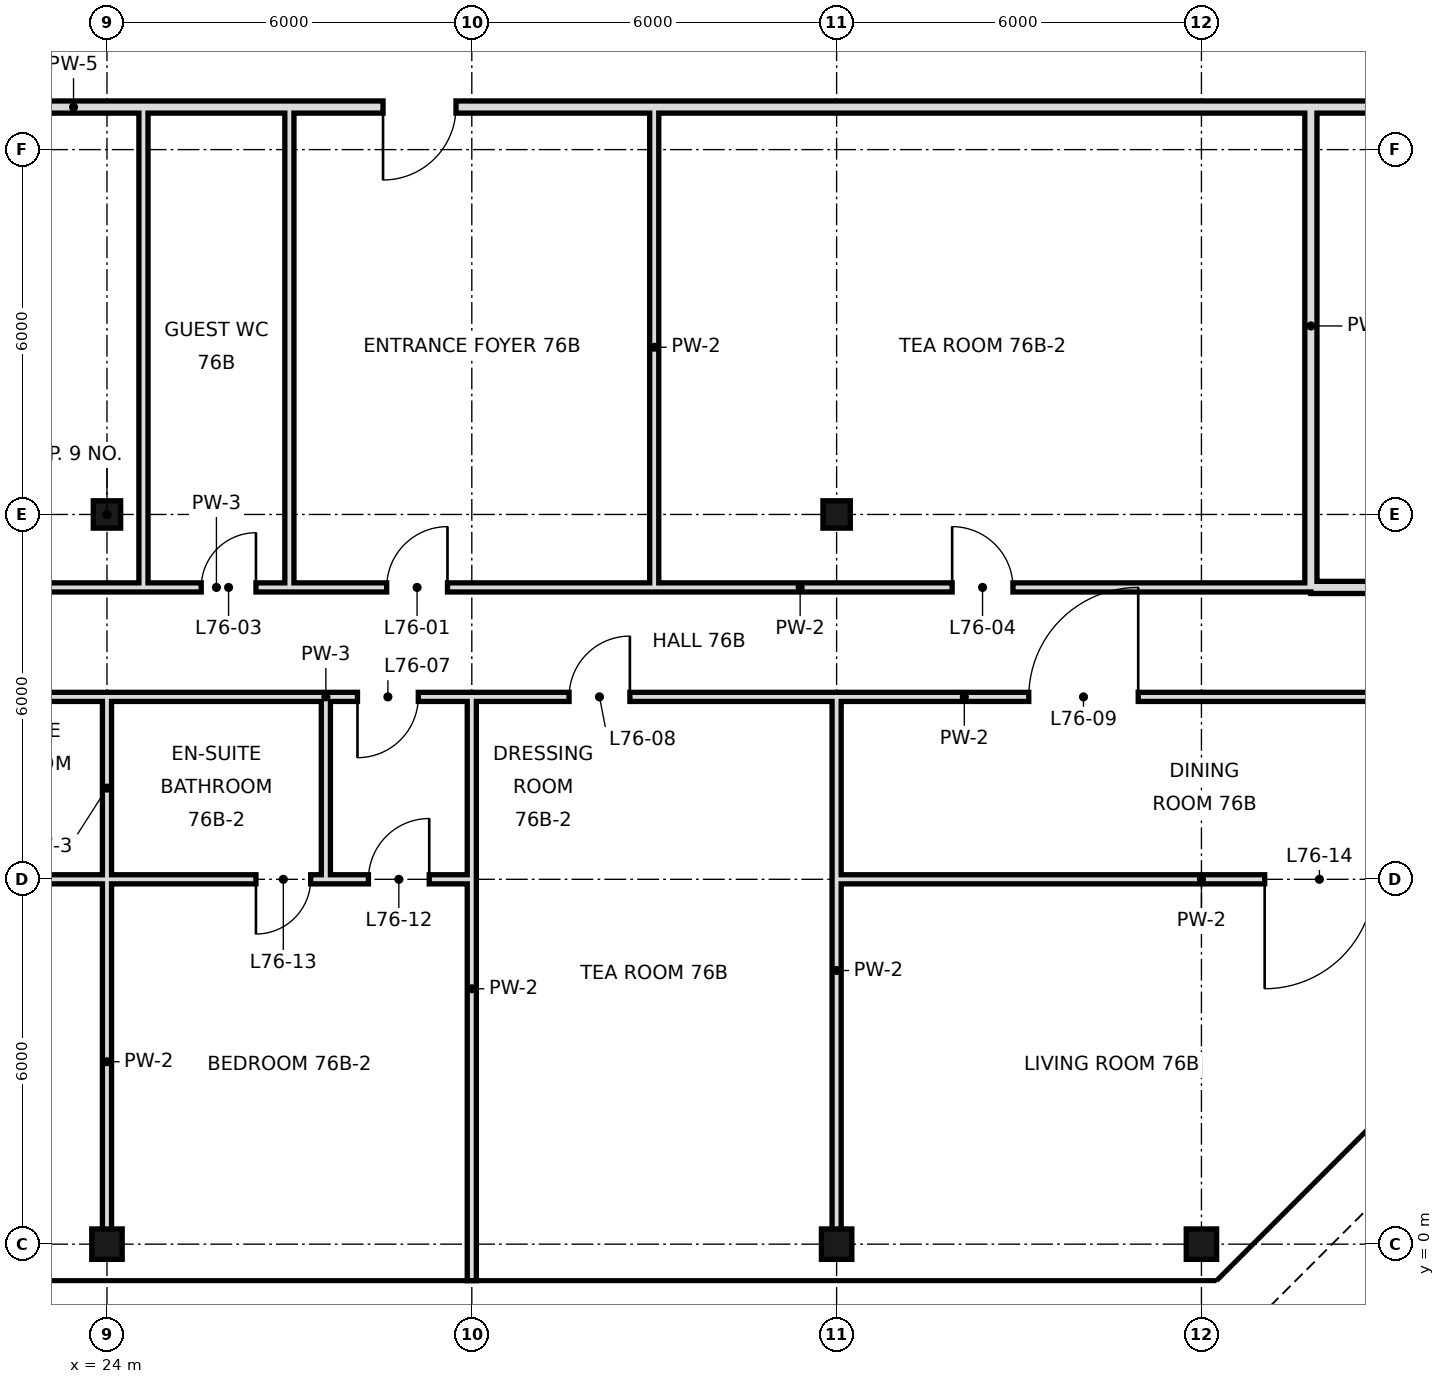
"""IFC4 building model, lengths in metres.
Left out: names, types, materials, properties, quantities, classifications, styles, units other than length and angle.
Written with IfcOpenShell. Run it as: python <this file> out.ifc"""

import sys

from ifc_helpers import new_model, si_unit, direction, frame, frame_2d, origin, origin_2d, place, context, subcontext, project, spatial, rectangle, hollow_rectangle, extrude, element, fill, save


model = new_model("IFC4")
c1 = context("Model", 3, precision=1e-05, world=origin(), true_north=direction((0.0, 1.0)))
c2 = subcontext(c1, "Body", "Model", "MODEL_VIEW")
j1 = project(units=[si_unit("LENGTHUNIT", "METRE"), si_unit("PLANEANGLEUNIT", "RADIAN")], contexts=[c1])
p1 = place(None, origin())
s1 = spatial("IfcSite", under=j1, at=p1, CompositionType="ELEMENT")
p2 = place(p1, origin())
s2 = spatial("IfcBuilding", under=s1, at=p2, CompositionType="ELEMENT")
p3 = place(p2, frame((0.0, 0.0, 319.6)))
s3 = spatial("IfcBuildingStorey", under=s2, at=p3, CompositionType="ELEMENT", Elevation=319.6)
p4 = place(p3, frame((24.0, 0.0, 0.0), z_axis=(0.0, 0.0, 1.0), x_axis=(1.0, 0.0, 0.0)))
e1 = element("IfcColumn", 1, at=p4, inside=s3, PredefinedType="COLUMN", context=c2, shape_type="SweptSolid", body=[
    extrude(hollow_rectangle(XDim=0.5, YDim=0.5, WallThickness=0.025, at=origin_2d()), origin(), (0.0, 0.0, 1.0), 3.6),
])
p5 = place(p3, frame((24.0, 12.0, 0.0), z_axis=(0.0, 0.0, 1.0), x_axis=(1.0, 0.0, 0.0)))
e2 = element("IfcColumn", 2, at=p5, inside=s3, PredefinedType="COLUMN", context=c2, shape_type="SweptSolid", body=[
    extrude(hollow_rectangle(XDim=0.45, YDim=0.45, WallThickness=0.022, at=origin_2d()), origin(), (0.0, 0.0, 1.0), 3.6),
])
p6 = place(p3, frame((36.0, 0.0, 0.0), z_axis=(0.0, 0.0, 1.0), x_axis=(1.0, 0.0, 0.0)))
e3 = element("IfcColumn", 3, at=p6, inside=s3, PredefinedType="COLUMN", context=c2, shape_type="SweptSolid", body=[
    extrude(hollow_rectangle(XDim=0.5, YDim=0.5, WallThickness=0.025, at=origin_2d()), origin(), (0.0, 0.0, 1.0), 3.6),
])
p7 = place(p3, frame((36.0, 12.0, 0.0), z_axis=(0.0, 0.0, 1.0), x_axis=(1.0, 0.0, 0.0)))
e4 = element("IfcColumn", 4, at=p7, inside=s3, PredefinedType="COLUMN", context=c2, shape_type="SweptSolid", body=[
    extrude(hollow_rectangle(XDim=0.45, YDim=0.45, WallThickness=0.022, at=origin_2d()), origin(), (0.0, 0.0, 1.0), 3.6),
])
p8 = place(p3, frame((42.0, 0.0, 0.0), z_axis=(0.0, 0.0, 1.0), x_axis=(1.0, 0.0, 0.0)))
e5 = element("IfcColumn", 5, at=p8, inside=s3, PredefinedType="COLUMN", context=c2, shape_type="SweptSolid", body=[
    extrude(hollow_rectangle(XDim=0.5, YDim=0.5, WallThickness=0.025, at=origin_2d()), origin(), (0.0, 0.0, 1.0), 3.6),
])
p9 = place(p3, frame((24.0, 0.0, 0.0), z_axis=(0.0, 0.0, 1.0), x_axis=(0.0, 1.0, 0.0)))
e6 = element("IfcWall", 6, at=p9, inside=s3, PredefinedType="PARTITIONING", context=c2, shape_type="SweptSolid", body=[
    extrude(rectangle(XDim=6.0, YDim=0.15, at=frame_2d((3.0, 0.0))), origin(), (0.0, 0.0, 1.0), 2.72),
])
p10 = place(p3, frame((24.0, 6.0, 0.0), z_axis=(0.0, 0.0, 1.0), x_axis=(0.0, 1.0, 0.0)))
e7 = element("IfcWall", 7, at=p10, inside=s3, PredefinedType="PARTITIONING", context=c2, shape_type="SweptSolid", body=[
    extrude(rectangle(XDim=3.0, YDim=0.15, at=frame_2d((1.5, 0.0))), origin(), (0.0, 0.0, 1.0), 2.72),
])
for number, where, z_axis, x_axis in (
    (8, (24.6, 10.8, 0.0), (0.0, 0.0, 1.0), (0.0, 1.0, 0.0)),
    (9, (27.0, 10.8, 0.0), (0.0, 0.0, 1.0), (0.0, 1.0, 0.0)),
):
    element("IfcWall", number, at=place(p3, frame(where, z_axis=z_axis, x_axis=x_axis)), inside=s3, PredefinedType="PARTITIONING", context=c2, shape_type="SweptSolid", body=[
        extrude(rectangle(XDim=7.9, YDim=0.15, at=frame_2d((3.95, 0.0))), origin(), (0.0, 0.0, 1.0), 3.42),
    ])
p11 = place(p3, frame((27.6, 6.0, 0.0), z_axis=(0.0, 0.0, 1.0), x_axis=(0.0, 1.0, 0.0)))
e10 = element("IfcWall", 10, at=p11, inside=s3, PredefinedType="PARTITIONING", context=c2, shape_type="SweptSolid", body=[
    extrude(rectangle(XDim=3.0, YDim=0.15, at=frame_2d((1.5, 0.0))), origin(), (0.0, 0.0, 1.0), 3.42),
])
p12 = place(p3, frame((30.0, -0.6, 0.0), z_axis=(0.0, 0.0, 1.0), x_axis=(0.0, 1.0, 0.0)))
e11 = element("IfcWall", 11, at=p12, inside=s3, PredefinedType="PARTITIONING", context=c2, shape_type="SweptSolid", body=[
    extrude(rectangle(XDim=9.6, YDim=0.15, at=frame_2d((4.8, 0.0))), origin(), (0.0, 0.0, 1.0), 2.72),
])
p13 = place(p3, frame((33.0, 10.8, 0.0), z_axis=(0.0, 0.0, 1.0), x_axis=(0.0, 1.0, 0.0)))
e12 = element("IfcWall", 12, at=p13, inside=s3, PredefinedType="PARTITIONING", context=c2, shape_type="SweptSolid", body=[
    extrude(rectangle(XDim=7.9, YDim=0.15, at=frame_2d((3.95, 0.0))), origin(), (0.0, 0.0, 1.0), 3.42),
])
p14 = place(p3, frame((36.0, 0.0, 0.0), z_axis=(0.0, 0.0, 1.0), x_axis=(0.0, 1.0, 0.0)))
e13 = element("IfcWall", 13, at=p14, inside=s3, PredefinedType="PARTITIONING", context=c2, shape_type="SweptSolid", body=[
    extrude(rectangle(XDim=9.0, YDim=0.15, at=frame_2d((4.5, 0.0))), origin(), (0.0, 0.0, 1.0), 2.72),
])
p15 = place(p3, frame((43.8, 10.8, 0.0), z_axis=(0.0, 0.0, 1.0), x_axis=(0.0, 1.0, 0.0)))
e14 = element("IfcWall", 14, at=p15, inside=s3, PredefinedType="SOLIDWALL", context=c2, shape_type="SweptSolid", body=[
    extrude(rectangle(XDim=7.9, YDim=0.2, at=frame_2d((3.95, 0.0))), origin(), (0.0, 0.0, 1.0), 2.72),
])
p16 = place(p3, frame((43.8, 10.8, 0.0), z_axis=(0.0, 0.0, 1.0), x_axis=(1.0, 0.0, 0.0)))
e15 = element("IfcWall", 15, at=p16, inside=s3, PredefinedType="SOLIDWALL", context=c2, shape_type="SweptSolid", body=[
    extrude(rectangle(XDim=4.8, YDim=0.2, at=frame_2d((2.4, 0.0))), origin(), (0.0, 0.0, 1.0), 2.97),
])
p17 = place(p16, frame((1.06, 0.0, 0.0)))
e16 = element("IfcOpeningElement", 16, at=p17, cuts=e15, PredefinedType="OPENING", context=c2, shape_type="SweptSolid", body=[
    extrude(rectangle(XDim=1.0, YDim=2.4, at=frame_2d((0.5, 1.2))), frame((0.0, 0.11, 0.0), z_axis=(0.0, -1.0, 0.0), x_axis=(1.0, 0.0, 0.0)), (0.0, 0.0, 1.0), 0.22),
])
p18 = place(p3, frame((18.0, 10.8, 0.0), z_axis=(0.0, 0.0, 1.0), x_axis=(1.0, 0.0, 0.0)))
e17 = element("IfcWall", 17, at=p18, inside=s3, PredefinedType="PARTITIONING", context=c2, shape_type="SweptSolid", body=[
    extrude(rectangle(XDim=6.6, YDim=0.15, at=frame_2d((3.3, 0.0))), origin(), (0.0, 0.0, 1.0), 3.42),
])
p19 = place(p18, frame((2.8, 0.0, 0.0)))
e18 = element("IfcOpeningElement", 18, at=p19, cuts=e17, PredefinedType="OPENING", context=c2, shape_type="SweptSolid", body=[
    extrude(rectangle(XDim=1.0, YDim=2.4, at=frame_2d((0.5, 1.2))), frame((0.0, 0.085, 0.0), z_axis=(0.0, -1.0, 0.0), x_axis=(1.0, 0.0, 0.0)), (0.0, 0.0, 1.0), 0.17),
])
p20 = place(p3, frame((27.0, 10.8, 0.0), z_axis=(0.0, 0.0, 1.0), x_axis=(1.0, 0.0, 0.0)))
e19 = element("IfcWall", 19, at=p20, inside=s3, PredefinedType="PARTITIONING", context=c2, shape_type="SweptSolid", body=[
    extrude(rectangle(XDim=16.8, YDim=0.15, at=frame_2d((8.4, 0.0))), origin(), (0.0, 0.0, 1.0), 3.42),
])
p21 = place(p20, frame((1.6, 0.0, 0.0)))
e20 = element("IfcOpeningElement", 20, at=p21, cuts=e19, PredefinedType="OPENING", context=c2, shape_type="SweptSolid", body=[
    extrude(rectangle(XDim=1.0, YDim=2.4, at=frame_2d((0.5, 1.2))), frame((0.0, 0.085, 0.0), z_axis=(0.0, -1.0, 0.0), x_axis=(1.0, 0.0, 0.0)), (0.0, 0.0, 1.0), 0.17),
])
p22 = place(p20, frame((10.9, 0.0, 0.0)))
e21 = element("IfcOpeningElement", 21, at=p22, cuts=e19, PredefinedType="OPENING", context=c2, shape_type="SweptSolid", body=[
    extrude(rectangle(XDim=1.0, YDim=2.4, at=frame_2d((0.5, 1.2))), frame((0.0, 0.085, 0.0), z_axis=(0.0, -1.0, 0.0), x_axis=(1.0, 0.0, 0.0)), (0.0, 0.0, 1.0), 0.17),
])
p23 = place(p3, frame((24.6, 10.8, 0.0), z_axis=(0.0, 0.0, 1.0), x_axis=(1.0, 0.0, 0.0)))
e22 = element("IfcWall", 22, at=p23, inside=s3, PredefinedType="PARTITIONING", context=c2, shape_type="SweptSolid", body=[
    extrude(rectangle(XDim=2.4, YDim=0.15, at=frame_2d((1.2, 0.0))), origin(), (0.0, 0.0, 1.0), 3.42),
])
p24 = place(p23, frame((0.95, 0.0, 0.0)))
e23 = element("IfcOpeningElement", 23, at=p24, cuts=e22, PredefinedType="OPENING", context=c2, shape_type="SweptSolid", body=[
    extrude(rectangle(XDim=0.9, YDim=2.4, at=frame_2d((0.45, 1.2))), frame((0.0, 0.085, 0.0), z_axis=(0.0, -1.0, 0.0), x_axis=(1.0, 0.0, 0.0)), (0.0, 0.0, 1.0), 0.17),
])
p25 = place(p3, frame((3.1, 18.7, 0.0), z_axis=(0.0, 0.0, 1.0), x_axis=(1.0, 0.0, 0.0)))
e24 = element("IfcWall", 24, at=p25, inside=s3, PredefinedType="SOLIDWALL", context=c2, shape_type="SweptSolid", body=[
    extrude(rectangle(XDim=40.7, YDim=0.2, at=frame_2d((20.35, 0.0))), origin(), (0.0, 0.0, 1.0), 2.72),
])
p26 = place(p25, frame((25.44, 0.0, 0.0)))
e25 = element("IfcOpeningElement", 25, at=p26, cuts=e24, PredefinedType="OPENING", context=c2, shape_type="SweptSolid", body=[
    extrude(rectangle(XDim=1.2, YDim=2.4, at=frame_2d((0.6, 1.2))), frame((0.0, 0.11, 0.0), z_axis=(0.0, -1.0, 0.0), x_axis=(1.0, 0.0, 0.0)), (0.0, 0.0, 1.0), 0.22),
])
p27 = place(p25, frame((6.55, 0.0, 0.0)))
e26 = element("IfcOpeningElement", 26, at=p27, cuts=e24, PredefinedType="OPENING", context=c2, shape_type="SweptSolid", body=[
    extrude(rectangle(XDim=1.8, YDim=2.4, at=frame_2d((0.9, 1.2))), frame((0.0, 0.11, 0.0), z_axis=(0.0, -1.0, 0.0), x_axis=(1.0, 0.0, 0.0)), (0.0, 0.0, 1.0), 0.22),
])
p28 = place(p3, frame((43.8, 18.7, 0.0), z_axis=(0.0, 0.0, 1.0), x_axis=(1.0, 0.0, 0.0)))
e27 = element("IfcWall", 27, at=p28, inside=s3, PredefinedType="SOLIDWALL", context=c2, shape_type="SweptSolid", body=[
    extrude(rectangle(XDim=1.1, YDim=0.2, at=frame_2d((0.55, 0.0))), origin(), (0.0, 0.0, 1.0), 3.42),
])
p29 = place(p3, frame((27.6, 6.0, 0.0), z_axis=(0.0, 0.0, 1.0), x_axis=(1.0, 0.0, 0.0)))
e28 = element("IfcWall", 28, at=p29, inside=s3, PredefinedType="PARTITIONING", context=c2, shape_type="SweptSolid", body=[
    extrude(rectangle(XDim=2.4, YDim=0.15, at=frame_2d((1.2, 0.0))), origin(), (0.0, 0.0, 1.0), 2.97),
])
p30 = place(p29, frame((0.7, 0.0, 0.0)))
e29 = element("IfcOpeningElement", 29, at=p30, cuts=e28, PredefinedType="OPENING", context=c2, shape_type="SweptSolid", body=[
    extrude(rectangle(XDim=1.0, YDim=2.4, at=frame_2d((0.5, 1.2))), frame((0.0, 0.085, 0.0), z_axis=(0.0, -1.0, 0.0), x_axis=(1.0, 0.0, 0.0)), (0.0, 0.0, 1.0), 0.17),
])
p31 = place(p3, frame((36.0, 6.0, 0.0), z_axis=(0.0, 0.0, 1.0), x_axis=(1.0, 0.0, 0.0)))
e30 = element("IfcWall", 30, at=p31, inside=s3, PredefinedType="PARTITIONING", context=c2, shape_type="SweptSolid", body=[
    extrude(rectangle(XDim=12.0, YDim=0.15, at=frame_2d((6.0, 0.0))), origin(), (0.0, 0.0, 1.0), 2.97),
])
p32 = place(p31, frame((7.04, 0.0, 0.0)))
e31 = element("IfcOpeningElement", 31, at=p32, cuts=e30, PredefinedType="OPENING", context=c2, shape_type="SweptSolid", body=[
    extrude(rectangle(XDim=1.8, YDim=2.4, at=frame_2d((0.9, 1.2))), frame((0.0, 0.085, 0.0), z_axis=(0.0, -1.0, 0.0), x_axis=(1.0, 0.0, 0.0)), (0.0, 0.0, 1.0), 0.17),
])
p33 = place(p3, frame((21.0, 6.0, 0.0), z_axis=(0.0, 0.0, 1.0), x_axis=(1.0, 0.0, 0.0)))
e32 = element("IfcWall", 32, at=p33, inside=s3, PredefinedType="PARTITIONING", context=c2, shape_type="SweptSolid", body=[
    extrude(rectangle(XDim=6.6, YDim=0.15, at=frame_2d((3.3, 0.0))), origin(), (0.0, 0.0, 1.0), 2.97),
])
p34 = place(p33, frame((0.25, 0.0, 0.0)))
e33 = element("IfcOpeningElement", 33, at=p34, cuts=e32, PredefinedType="OPENING", context=c2, shape_type="SweptSolid", body=[
    extrude(rectangle(XDim=0.9, YDim=2.4, at=frame_2d((0.45, 1.2))), frame((0.0, 0.085, 0.0), z_axis=(0.0, -1.0, 0.0), x_axis=(1.0, 0.0, 0.0)), (0.0, 0.0, 1.0), 0.17),
])
p35 = place(p33, frame((5.45, 0.0, 0.0)))
e34 = element("IfcOpeningElement", 34, at=p35, cuts=e32, PredefinedType="OPENING", context=c2, shape_type="SweptSolid", body=[
    extrude(rectangle(XDim=0.9, YDim=2.4, at=frame_2d((0.45, 1.2))), frame((0.0, 0.085, 0.0), z_axis=(0.0, -1.0, 0.0), x_axis=(1.0, 0.0, 0.0)), (0.0, 0.0, 1.0), 0.17),
])
p36 = place(p3, frame((27.6, 9.0, 0.0), z_axis=(0.0, 0.0, 1.0), x_axis=(1.0, 0.0, 0.0)))
e35 = element("IfcWall", 35, at=p36, inside=s3, PredefinedType="PARTITIONING", context=c2, shape_type="SweptSolid", body=[
    extrude(rectangle(XDim=21.0, YDim=0.15, at=frame_2d((10.5, 0.0))), origin(), (0.0, 0.0, 1.0), 3.42),
])
p37 = place(p36, frame((0.52, 0.0, 0.0)))
e36 = element("IfcOpeningElement", 36, at=p37, cuts=e35, PredefinedType="OPENING", context=c2, shape_type="SweptSolid", body=[
    extrude(rectangle(XDim=1.0, YDim=2.4, at=frame_2d((0.5, 1.2))), frame((0.0, 0.085, 0.0), z_axis=(0.0, -1.0, 0.0), x_axis=(1.0, 0.0, 0.0)), (0.0, 0.0, 1.0), 0.17),
])
p38 = place(p36, frame((4.0, 0.0, 0.0)))
e37 = element("IfcOpeningElement", 37, at=p38, cuts=e35, PredefinedType="OPENING", context=c2, shape_type="SweptSolid", body=[
    extrude(rectangle(XDim=1.0, YDim=2.4, at=frame_2d((0.5, 1.2))), frame((0.0, 0.085, 0.0), z_axis=(0.0, -1.0, 0.0), x_axis=(1.0, 0.0, 0.0)), (0.0, 0.0, 1.0), 0.17),
])
p39 = place(p36, frame((11.56, 0.0, 0.0)))
e38 = element("IfcOpeningElement", 38, at=p39, cuts=e35, PredefinedType="OPENING", context=c2, shape_type="SweptSolid", body=[
    extrude(rectangle(XDim=1.8, YDim=2.4, at=frame_2d((0.9, 1.2))), frame((0.0, 0.085, 0.0), z_axis=(0.0, -1.0, 0.0), x_axis=(1.0, 0.0, 0.0)), (0.0, 0.0, 1.0), 0.17),
])
p40 = place(p3, frame((21.0, 9.0, 0.0), z_axis=(0.0, 0.0, 1.0), x_axis=(1.0, 0.0, 0.0)))
e39 = element("IfcWall", 39, at=p40, inside=s3, PredefinedType="PARTITIONING", context=c2, shape_type="SweptSolid", body=[
    extrude(rectangle(XDim=6.6, YDim=0.15, at=frame_2d((3.3, 0.0))), origin(), (0.0, 0.0, 1.0), 3.42),
])
p41 = place(p21, frame((1.0, 0.0, 0.0), z_axis=(0.0, 0.0, 1.0), x_axis=(-1.0, 0.0, 0.0)))
e40 = element("IfcDoor", 40, at=p41, inside=s3, OperationType="SINGLE_SWING_LEFT", PredefinedType="DOOR", context=c2, shape_type="SweptSolid", body=[
    extrude(rectangle(XDim=1.0, YDim=2.4, at=frame_2d((0.5, 1.2))), frame((0.0, 0.025, 0.0), z_axis=(0.0, -1.0, 0.0), x_axis=(1.0, 0.0, 0.0)), (0.0, 0.0, 1.0), 0.05),
])
fill(e20, e40)
p42 = place(p24, frame((0.9, 0.0, 0.0), z_axis=(0.0, 0.0, 1.0), x_axis=(-1.0, 0.0, 0.0)))
e41 = element("IfcDoor", 41, at=p42, inside=s3, OperationType="SINGLE_SWING_LEFT", PredefinedType="DOOR", context=c2, shape_type="SweptSolid", body=[
    extrude(rectangle(XDim=0.9, YDim=2.4, at=frame_2d((0.45, 1.2))), frame((0.0, 0.025, 0.0), z_axis=(0.0, -1.0, 0.0), x_axis=(1.0, 0.0, 0.0)), (0.0, 0.0, 1.0), 0.05),
])
fill(e23, e41)
p43 = place(p22, origin())
e42 = element("IfcDoor", 42, at=p43, inside=s3, OperationType="SINGLE_SWING_LEFT", PredefinedType="DOOR", context=c2, shape_type="SweptSolid", body=[
    extrude(rectangle(XDim=1.0, YDim=2.4, at=frame_2d((0.5, 1.2))), frame((0.0, 0.025, 0.0), z_axis=(0.0, -1.0, 0.0), x_axis=(1.0, 0.0, 0.0)), (0.0, 0.0, 1.0), 0.05),
])
fill(e21, e42)
p44 = place(p37, frame((1.0, 0.0, 0.0), z_axis=(0.0, 0.0, 1.0), x_axis=(-1.0, 0.0, 0.0)))
e43 = element("IfcDoor", 43, at=p44, inside=s3, OperationType="SINGLE_SWING_RIGHT", PredefinedType="DOOR", context=c2, shape_type="SweptSolid", body=[
    extrude(rectangle(XDim=1.0, YDim=2.4, at=frame_2d((0.5, 1.2))), frame((0.0, 0.025, 0.0), z_axis=(0.0, -1.0, 0.0), x_axis=(1.0, 0.0, 0.0)), (0.0, 0.0, 1.0), 0.05),
])
fill(e36, e43)
p45 = place(p38, frame((1.0, 0.0, 0.0), z_axis=(0.0, 0.0, 1.0), x_axis=(-1.0, 0.0, 0.0)))
e44 = element("IfcDoor", 44, at=p45, inside=s3, OperationType="SINGLE_SWING_LEFT", PredefinedType="DOOR", context=c2, shape_type="SweptSolid", body=[
    extrude(rectangle(XDim=1.0, YDim=2.4, at=frame_2d((0.5, 1.2))), frame((0.0, 0.025, 0.0), z_axis=(0.0, -1.0, 0.0), x_axis=(1.0, 0.0, 0.0)), (0.0, 0.0, 1.0), 0.05),
])
fill(e37, e44)
p46 = place(p39, frame((1.8, 0.0, 0.0), z_axis=(0.0, 0.0, 1.0), x_axis=(-1.0, 0.0, 0.0)))
e45 = element("IfcDoor", 45, at=p46, inside=s3, OperationType="SINGLE_SWING_LEFT", PredefinedType="DOOR", context=c2, shape_type="SweptSolid", body=[
    extrude(rectangle(XDim=1.8, YDim=2.4, at=frame_2d((0.9, 1.2))), frame((0.0, 0.025, 0.0), z_axis=(0.0, -1.0, 0.0), x_axis=(1.0, 0.0, 0.0)), (0.0, 0.0, 1.0), 0.05),
])
fill(e38, e45)
p47 = place(p30, frame((1.0, 0.0, 0.0), z_axis=(0.0, 0.0, 1.0), x_axis=(-1.0, 0.0, 0.0)))
e46 = element("IfcDoor", 46, at=p47, inside=s3, OperationType="SINGLE_SWING_LEFT", PredefinedType="DOOR", context=c2, shape_type="SweptSolid", body=[
    extrude(rectangle(XDim=1.0, YDim=2.4, at=frame_2d((0.5, 1.2))), frame((0.0, 0.025, 0.0), z_axis=(0.0, -1.0, 0.0), x_axis=(1.0, 0.0, 0.0)), (0.0, 0.0, 1.0), 0.05),
])
fill(e29, e46)
p48 = place(p35, frame((0.9, 0.0, 0.0), z_axis=(0.0, 0.0, 1.0), x_axis=(-1.0, 0.0, 0.0)))
e47 = element("IfcDoor", 47, at=p48, inside=s3, OperationType="SINGLE_SWING_RIGHT", PredefinedType="DOOR", context=c2, shape_type="SweptSolid", body=[
    extrude(rectangle(XDim=0.9, YDim=2.4, at=frame_2d((0.45, 1.2))), frame((0.0, 0.025, 0.0), z_axis=(0.0, -1.0, 0.0), x_axis=(1.0, 0.0, 0.0)), (0.0, 0.0, 1.0), 0.05),
])
fill(e34, e47)
p49 = place(p32, frame((1.8, 0.0, 0.0), z_axis=(0.0, 0.0, 1.0), x_axis=(-1.0, 0.0, 0.0)))
e48 = element("IfcDoor", 48, at=p49, inside=s3, OperationType="SINGLE_SWING_RIGHT", PredefinedType="DOOR", context=c2, shape_type="SweptSolid", body=[
    extrude(rectangle(XDim=1.8, YDim=2.4, at=frame_2d((0.9, 1.2))), frame((0.0, 0.025, 0.0), z_axis=(0.0, -1.0, 0.0), x_axis=(1.0, 0.0, 0.0)), (0.0, 0.0, 1.0), 0.05),
])
fill(e31, e48)
p50 = place(p26, frame((1.2, 0.0, 0.0), z_axis=(0.0, 0.0, 1.0), x_axis=(-1.0, 0.0, 0.0)))
e49 = element("IfcDoor", 49, at=p50, inside=s3, OperationType="SINGLE_SWING_RIGHT", PredefinedType="DOOR", context=c2, shape_type="SweptSolid", body=[
    extrude(rectangle(XDim=1.2, YDim=2.4, at=frame_2d((0.6, 1.2))), frame((0.0, 0.025, 0.0), z_axis=(0.0, -1.0, 0.0), x_axis=(1.0, 0.0, 0.0)), (0.0, 0.0, 1.0), 0.05),
])
fill(e25, e49)
save(model, sys.argv[1])
